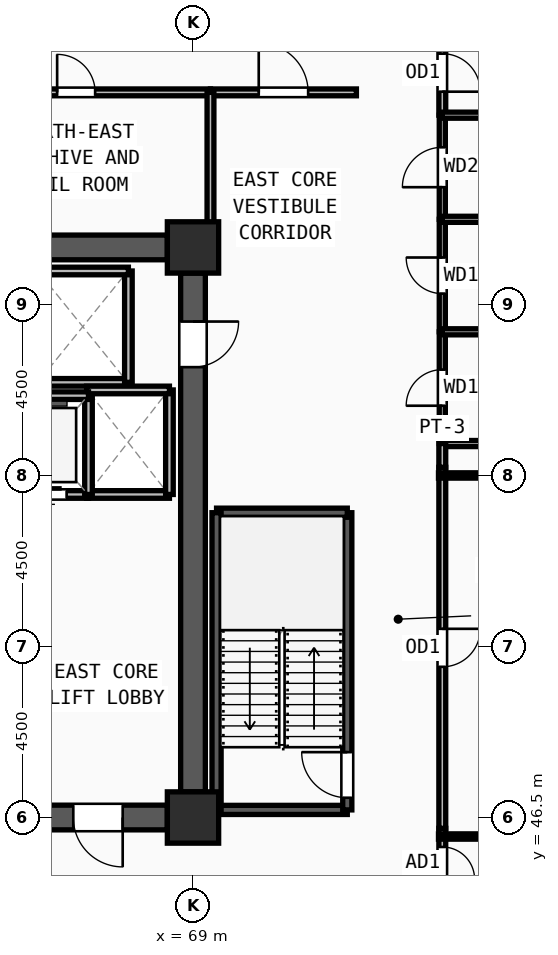
"""IFC4 building model, lengths in metres.
Left out: names, types, materials, properties, quantities, classifications, styles, units other than length and angle.
Written with IfcOpenShell. Run it as: python <this file> out.ifc"""

import sys

from ifc_helpers import new_model, si_unit, direction, frame, frame_2d, origin, origin_2d, place, context, subcontext, project, spatial, rectangle, extrude, source, transform, mapped, element, fill, save


model = new_model("IFC4")
c1 = context("Model", 3, precision=1e-05, world=origin(), true_north=direction((0.0, 1.0)))
c2 = subcontext(c1, "Body", "Model", "MODEL_VIEW")
j1 = project(units=[si_unit("LENGTHUNIT", "METRE"), si_unit("PLANEANGLEUNIT", "RADIAN")], contexts=[c1])
p1 = place(None, origin())
s1 = spatial("IfcSite", under=j1, at=p1, CompositionType="ELEMENT")
p2 = place(p1, origin())
s2 = spatial("IfcBuilding", under=s1, at=p2, CompositionType="ELEMENT")
p3 = place(p2, frame((0.0, 0.0, 201.75)))
s3 = spatial("IfcBuildingStorey", under=s2, at=p3, CompositionType="ELEMENT", Elevation=201.75)
m1 = source(origin(), c2, "Body", "SweptSolid", [
    extrude(rectangle(XDim=1.35, YDim=1.35, at=origin_2d()), origin(), (0.0, 0.0, 1.0), 3.75),
])
for number, where, z_axis, x_axis in (
    (1, (69.0, 46.5, 0.0), (0.0, 0.0, 1.0), (1.0, 0.0, 0.0)),
    (2, (69.0, 61.5, 0.0), (0.0, 0.0, 1.0), (1.0, 0.0, 0.0)),
):
    element("IfcColumn", number, at=place(p3, frame(where, z_axis=z_axis, x_axis=x_axis)), inside=s3, PredefinedType="COLUMN", context=c2, shape_type="MappedRepresentation", body=[
        mapped(m1, transform((0.0, 0.0, 0.0), x_axis=(1.0, 0.0, 0.0), y_axis=(0.0, 1.0, 0.0), z_axis=(0.0, 0.0, 1.0), scale=1.0)),
    ])
p4 = place(p3, frame((60.675, 61.5, 0.0), z_axis=(0.0, 0.0, 1.0), x_axis=(1.0, 0.0, 0.0)))
e3 = element("IfcWall", 3, at=p4, inside=s3, PredefinedType="SHEAR", context=c2, shape_type="SweptSolid", body=[
    extrude(rectangle(XDim=7.65, YDim=0.65, at=frame_2d((3.825, 0.0))), origin(), (0.0, 0.0, 1.0), 3.57),
])
p5 = place(p3, frame((69.0, 60.825, 0.0), z_axis=(0.0, 0.0, 1.0), x_axis=(0.0, -1.0, 0.0)))
e4 = element("IfcWall", 4, at=p5, inside=s3, PredefinedType="SHEAR", context=c2, shape_type="SweptSolid", body=[
    extrude(rectangle(XDim=13.65, YDim=0.65, at=frame_2d((6.825, 0.0))), origin(), (0.0, 0.0, 1.0), 3.57),
])
m2 = source(origin(), c2, "Body", "SweptSolid", [
    extrude(rectangle(XDim=1.2, YDim=2.2, at=frame_2d((0.6, 1.1))), frame((0.0, 0.335, 0.0), z_axis=(0.0, -1.0, 0.0), x_axis=(1.0, 0.0, 0.0)), (0.0, 0.0, 1.0), 0.67),
])
p6 = place(p5, frame((1.275, 0.0, 0.0)))
e5 = element("IfcOpeningElement", 5, at=p6, cuts=e4, PredefinedType="OPENING", context=c2, shape_type="MappedRepresentation", body=[
    mapped(m2, transform((0.0, 0.0, 0.0), x_axis=(1.0, 0.0, 0.0), y_axis=(0.0, 1.0, 0.0), z_axis=(0.0, 0.0, 1.0), scale=1.0)),
])
p7 = place(p3, frame((68.325, 46.5, 0.0), z_axis=(0.0, 0.0, 1.0), x_axis=(-1.0, 0.0, 0.0)))
e6 = element("IfcWall", 6, at=p7, inside=s3, PredefinedType="SHEAR", context=c2, shape_type="SweptSolid", body=[
    extrude(rectangle(XDim=7.65, YDim=0.65, at=frame_2d((3.825, 0.0))), origin(), (0.0, 0.0, 1.0), 3.57),
])
m3 = source(origin(), c2, "Body", "SweptSolid", [
    extrude(rectangle(XDim=1.3, YDim=2.2, at=frame_2d((0.65, 1.1))), frame((0.0, 0.335, 0.0), z_axis=(0.0, -1.0, 0.0), x_axis=(1.0, 0.0, 0.0)), (0.0, 0.0, 1.0), 0.67),
])
p8 = place(p7, frame((1.175, 0.0, 0.0)))
e7 = element("IfcOpeningElement", 7, at=p8, cuts=e6, PredefinedType="OPENING", context=c2, shape_type="MappedRepresentation", body=[
    mapped(m3, transform((0.0, 0.0, 0.0), x_axis=(1.0, 0.0, 0.0), y_axis=(0.0, 1.0, 0.0), z_axis=(0.0, 0.0, 1.0), scale=1.0)),
])
p9 = place(p3, frame((69.62, 46.7, 0.0), z_axis=(0.0, 0.0, 1.0), x_axis=(1.0, 0.0, 0.0)))
e8 = element("IfcWall", 8, at=p9, inside=s3, PredefinedType="SOLIDWALL", context=c2, shape_type="SweptSolid", body=[
    extrude(rectangle(XDim=3.44, YDim=0.24, at=frame_2d((1.72, 0.0))), origin(), (0.0, 0.0, 1.0), 3.57),
])
p10 = place(p3, frame((73.06, 46.7, 0.0), z_axis=(0.0, 0.0, 1.0), x_axis=(0.0, 1.0, 0.0)))
e9 = element("IfcWall", 9, at=p10, inside=s3, PredefinedType="SOLIDWALL", context=c2, shape_type="SweptSolid", body=[
    extrude(rectangle(XDim=7.82, YDim=0.24, at=frame_2d((3.91, 0.0))), origin(), (0.0, 0.0, 1.0), 3.57),
])
m4 = source(origin(), c2, "Body", "SweptSolid", [
    extrude(rectangle(XDim=1.2, YDim=2.2, at=frame_2d((0.6, 1.1))), frame((0.0, 0.13, 0.0), z_axis=(0.0, -1.0, 0.0), x_axis=(1.0, 0.0, 0.0)), (0.0, 0.0, 1.0), 0.26),
])
p11 = place(p10, frame((0.32, 0.0, 0.0)))
e10 = element("IfcOpeningElement", 10, at=p11, cuts=e9, PredefinedType="OPENING", context=c2, shape_type="MappedRepresentation", body=[
    mapped(m4, transform((0.0, 0.0, 0.0), x_axis=(1.0, 0.0, 0.0), y_axis=(0.0, 1.0, 0.0), z_axis=(0.0, 0.0, 1.0), scale=1.0)),
])
p12 = place(p3, frame((73.06, 54.52, 0.0), z_axis=(0.0, 0.0, 1.0), x_axis=(-1.0, 0.0, 0.0)))
e11 = element("IfcWall", 11, at=p12, inside=s3, PredefinedType="SOLIDWALL", context=c2, shape_type="SweptSolid", body=[
    extrude(rectangle(XDim=3.44, YDim=0.24, at=frame_2d((1.72, 0.0))), origin(), (0.0, 0.0, 1.0), 3.57),
])
p13 = place(p3, frame((69.62, 54.52, 0.0), z_axis=(0.0, 0.0, 1.0), x_axis=(0.0, -1.0, 0.0)))
e12 = element("IfcWall", 12, at=p13, inside=s3, PredefinedType="SOLIDWALL", context=c2, shape_type="SweptSolid", body=[
    extrude(rectangle(XDim=7.82, YDim=0.24, at=frame_2d((3.91, 0.0))), origin(), (0.0, 0.0, 1.0), 3.57),
])
p14 = place(p3, frame((64.9, 57.95, 0.0), z_axis=(0.0, 0.0, 1.0), x_axis=(1.0, 0.0, 0.0)))
e13 = element("IfcWall", 13, at=p14, inside=s3, PredefinedType="SOLIDWALL", context=c2, shape_type="SweptSolid", body=[
    extrude(rectangle(XDim=2.4, YDim=0.2, at=frame_2d((1.2, 0.0))), origin(), (0.0, 0.0, 1.0), 3.57),
])
p15 = place(p3, frame((67.3, 57.95, 0.0), z_axis=(0.0, 0.0, 1.0), x_axis=(0.0, 1.0, 0.0)))
e14 = element("IfcWall", 14, at=p15, inside=s3, PredefinedType="SOLIDWALL", context=c2, shape_type="SweptSolid", body=[
    extrude(rectangle(XDim=2.93, YDim=0.2, at=frame_2d((1.465, 0.0))), origin(), (0.0, 0.0, 1.0), 3.57),
])
p16 = place(p3, frame((67.3, 60.88, 0.0), z_axis=(0.0, 0.0, 1.0), x_axis=(-1.0, 0.0, 0.0)))
e15 = element("IfcWall", 15, at=p16, inside=s3, PredefinedType="SOLIDWALL", context=c2, shape_type="SweptSolid", body=[
    extrude(rectangle(XDim=2.4, YDim=0.2, at=frame_2d((1.2, 0.0))), origin(), (0.0, 0.0, 1.0), 3.57),
])
p17 = place(p3, frame((66.2, 55.0, 0.0), z_axis=(0.0, 0.0, 1.0), x_axis=(1.0, 0.0, 0.0)))
e16 = element("IfcWall", 16, at=p17, inside=s3, PredefinedType="SOLIDWALL", context=c2, shape_type="SweptSolid", body=[
    extrude(rectangle(XDim=2.18, YDim=0.2, at=frame_2d((1.09, 0.0))), origin(), (0.0, 0.0, 1.0), 3.57),
])
p18 = place(p3, frame((68.38, 55.0, 0.0), z_axis=(0.0, 0.0, 1.0), x_axis=(0.0, 1.0, 0.0)))
e17 = element("IfcWall", 17, at=p18, inside=s3, PredefinedType="SOLIDWALL", context=c2, shape_type="SweptSolid", body=[
    extrude(rectangle(XDim=2.75, YDim=0.2, at=frame_2d((1.375, 0.0))), origin(), (0.0, 0.0, 1.0), 3.57),
])
p19 = place(p3, frame((68.38, 57.75, 0.0), z_axis=(0.0, 0.0, 1.0), x_axis=(-1.0, 0.0, 0.0)))
e18 = element("IfcWall", 18, at=p19, inside=s3, PredefinedType="SOLIDWALL", context=c2, shape_type="SweptSolid", body=[
    extrude(rectangle(XDim=2.18, YDim=0.2, at=frame_2d((1.09, 0.0))), origin(), (0.0, 0.0, 1.0), 3.57),
])
p20 = place(p3, frame((64.0, 55.0, 0.0), z_axis=(0.0, 0.0, 1.0), x_axis=(1.0, 0.0, 0.0)))
e19 = element("IfcWall", 19, at=p20, inside=s3, PredefinedType="SOLIDWALL", context=c2, shape_type="SweptSolid", body=[
    extrude(rectangle(XDim=2.25, YDim=0.2, at=frame_2d((1.125, 0.0))), origin(), (0.0, 0.0, 1.0), 3.57),
])
m5 = source(origin(), c2, "Body", "SweptSolid", [
    extrude(rectangle(XDim=1.1, YDim=2.2, at=frame_2d((0.55, 1.1))), frame((0.0, 0.11, 0.0), z_axis=(0.0, -1.0, 0.0), x_axis=(1.0, 0.0, 0.0)), (0.0, 0.0, 1.0), 0.22),
])
p21 = place(p20, frame((0.575, 0.0, 0.0)))
e20 = element("IfcOpeningElement", 20, at=p21, cuts=e19, PredefinedType="OPENING", context=c2, shape_type="MappedRepresentation", body=[
    mapped(m5, transform((0.0, 0.0, 0.0), x_axis=(1.0, 0.0, 0.0), y_axis=(0.0, 1.0, 0.0), z_axis=(0.0, 0.0, 1.0), scale=1.0)),
])
p22 = place(p3, frame((66.25, 55.0, 0.0), z_axis=(0.0, 0.0, 1.0), x_axis=(0.0, 1.0, 0.0)))
e21 = element("IfcWall", 21, at=p22, inside=s3, PredefinedType="SOLIDWALL", context=c2, shape_type="SweptSolid", body=[
    extrude(rectangle(XDim=2.6, YDim=0.2, at=frame_2d((1.3, 0.0))), origin(), (0.0, 0.0, 1.0), 3.57),
])
p23 = place(p3, frame((66.25, 57.6, 0.0), z_axis=(0.0, 0.0, 1.0), x_axis=(-1.0, 0.0, 0.0)))
e22 = element("IfcWall", 22, at=p23, inside=s3, PredefinedType="SOLIDWALL", context=c2, shape_type="SweptSolid", body=[
    extrude(rectangle(XDim=2.25, YDim=0.2, at=frame_2d((1.125, 0.0))), origin(), (0.0, 0.0, 1.0), 3.57),
])
p24 = place(p3, frame((75.56, 56.34, 0.0), z_axis=(0.0, 0.0, 1.0), x_axis=(0.0, 1.0, 0.0)))
e23 = element("IfcWall", 23, at=p24, inside=s3, PredefinedType="PARTITIONING", context=c2, shape_type="SweptSolid", body=[
    extrude(rectangle(XDim=2.94, YDim=0.16, at=frame_2d((1.47, 0.0))), origin(), (0.0, 0.0, 1.0), 3.57),
])
m6 = source(origin(), c2, "Body", "SweptSolid", [
    extrude(rectangle(XDim=0.95, YDim=2.15, at=frame_2d((0.475, 1.075))), frame((0.0, 0.09, 0.0), z_axis=(0.0, -1.0, 0.0), x_axis=(1.0, 0.0, 0.0)), (0.0, 0.0, 1.0), 0.18),
])
p25 = place(p24, frame((0.995, 0.0, 0.0)))
e24 = element("IfcOpeningElement", 24, at=p25, cuts=e23, PredefinedType="OPENING", context=c2, shape_type="MappedRepresentation", body=[
    mapped(m6, transform((0.0, 0.0, 0.0), x_axis=(1.0, 0.0, 0.0), y_axis=(0.0, 1.0, 0.0), z_axis=(0.0, 0.0, 1.0), scale=1.0)),
])
p26 = place(p3, frame((75.56, 59.28, 0.0), z_axis=(0.0, 0.0, 1.0), x_axis=(0.0, 1.0, 0.0)))
e25 = element("IfcWall", 25, at=p26, inside=s3, PredefinedType="PARTITIONING", context=c2, shape_type="SweptSolid", body=[
    extrude(rectangle(XDim=2.96, YDim=0.16, at=frame_2d((1.48, 0.0))), origin(), (0.0, 0.0, 1.0), 3.57),
])
p27 = place(p26, frame((1.005, 0.0, 0.0)))
e26 = element("IfcOpeningElement", 26, at=p27, cuts=e25, PredefinedType="OPENING", context=c2, shape_type="MappedRepresentation", body=[
    mapped(m6, transform((0.0, 0.0, 0.0), x_axis=(1.0, 0.0, 0.0), y_axis=(0.0, 1.0, 0.0), z_axis=(0.0, 0.0, 1.0), scale=1.0)),
])
p28 = place(p3, frame((75.56, 62.24, 0.0), z_axis=(0.0, 0.0, 1.0), x_axis=(0.0, 1.0, 0.0)))
e27 = element("IfcWall", 27, at=p28, inside=s3, PredefinedType="PARTITIONING", context=c2, shape_type="SweptSolid", body=[
    extrude(rectangle(XDim=2.74, YDim=0.16, at=frame_2d((1.37, 0.0))), origin(), (0.0, 0.0, 1.0), 3.57),
])
m7 = source(origin(), c2, "Body", "SweptSolid", [
    extrude(rectangle(XDim=1.05, YDim=2.15, at=frame_2d((0.525, 1.075))), frame((0.0, 0.09, 0.0), z_axis=(0.0, -1.0, 0.0), x_axis=(1.0, 0.0, 0.0)), (0.0, 0.0, 1.0), 0.18),
])
p29 = place(p28, frame((0.845, 0.0, 0.0)))
e28 = element("IfcOpeningElement", 28, at=p29, cuts=e27, PredefinedType="OPENING", context=c2, shape_type="MappedRepresentation", body=[
    mapped(m7, transform((0.0, 0.0, 0.0), x_axis=(1.0, 0.0, 0.0), y_axis=(0.0, 1.0, 0.0), z_axis=(0.0, 0.0, 1.0), scale=1.0)),
])
p30 = place(p3, frame((62.39, 65.58, 0.0), z_axis=(0.0, 0.0, 1.0), x_axis=(1.0, 0.0, 0.0)))
e29 = element("IfcWall", 29, at=p30, inside=s3, PredefinedType="PARTITIONING", context=c2, shape_type="SweptSolid", body=[
    extrude(rectangle(XDim=7.07, YDim=0.18, at=frame_2d((3.535, 0.0))), origin(), (0.0, 0.0, 1.0), 3.57),
])
m8 = source(origin(), c2, "Body", "SweptSolid", [
    extrude(rectangle(XDim=1.0, YDim=2.2, at=frame_2d((0.5, 1.1))), frame((0.0, 0.1, 0.0), z_axis=(0.0, -1.0, 0.0), x_axis=(1.0, 0.0, 0.0)), (0.0, 0.0, 1.0), 0.2),
])
p31 = place(p30, frame((3.035, 0.0, 0.0)))
e30 = element("IfcOpeningElement", 30, at=p31, cuts=e29, PredefinedType="OPENING", context=c2, shape_type="MappedRepresentation", body=[
    mapped(m8, transform((0.0, 0.0, 0.0), x_axis=(1.0, 0.0, 0.0), y_axis=(0.0, 1.0, 0.0), z_axis=(0.0, 0.0, 1.0), scale=1.0)),
])
p32 = place(p3, frame((69.46, 65.58, 0.0), z_axis=(0.0, 0.0, 1.0), x_axis=(1.0, 0.0, 0.0)))
e31 = element("IfcWall", 31, at=p32, inside=s3, PredefinedType="PARTITIONING", context=c2, shape_type="SweptSolid", body=[
    extrude(rectangle(XDim=3.84, YDim=0.18, at=frame_2d((1.92, 0.0))), origin(), (0.0, 0.0, 1.0), 3.57),
])
m9 = source(origin(), c2, "Body", "SweptSolid", [
    extrude(rectangle(XDim=1.3, YDim=2.2, at=frame_2d((0.65, 1.1))), frame((0.0, 0.1, 0.0), z_axis=(0.0, -1.0, 0.0), x_axis=(1.0, 0.0, 0.0)), (0.0, 0.0, 1.0), 0.2),
])
p33 = place(p32, frame((1.27, 0.0, 0.0)))
e32 = element("IfcOpeningElement", 32, at=p33, cuts=e31, PredefinedType="OPENING", context=c2, shape_type="MappedRepresentation", body=[
    mapped(m9, transform((0.0, 0.0, 0.0), x_axis=(1.0, 0.0, 0.0), y_axis=(0.0, 1.0, 0.0), z_axis=(0.0, 0.0, 1.0), scale=1.0)),
])
p34 = place(p3, frame((75.56, 67.215, 0.0), z_axis=(0.0, 0.0, 1.0), x_axis=(0.0, -1.0, 0.0)))
e33 = element("IfcWall", 33, at=p34, inside=s3, PredefinedType="PARTITIONING", context=c2, shape_type="SweptSolid", body=[
    extrude(rectangle(XDim=2.235, YDim=0.18, at=frame_2d((1.118, 0.0))), origin(), (0.0, 0.0, 1.0), 3.57),
])
p35 = place(p34, frame((0.617, 0.0, 0.0)))
e34 = element("IfcOpeningElement", 34, at=p35, cuts=e33, PredefinedType="OPENING", context=c2, shape_type="MappedRepresentation", body=[
    mapped(m8, transform((0.0, 0.0, 0.0), x_axis=(1.0, 0.0, 0.0), y_axis=(0.0, 1.0, 0.0), z_axis=(0.0, 0.0, 1.0), scale=1.0)),
])
p36 = place(p3, frame((75.56, 46.215, 0.0), z_axis=(0.0, 0.0, 1.0), x_axis=(0.0, -1.0, 0.0)))
e35 = element("IfcWall", 35, at=p36, inside=s3, PredefinedType="PARTITIONING", context=c2, shape_type="SweptSolid", body=[
    extrude(rectangle(XDim=1.83, YDim=0.18, at=frame_2d((0.915, 0.0))), origin(), (0.0, 0.0, 1.0), 3.57),
])
m10 = source(origin(), c2, "Body", "SweptSolid", [
    extrude(rectangle(XDim=0.85, YDim=2.1, at=frame_2d((0.425, 1.05))), frame((0.0, 0.1, 0.0), z_axis=(0.0, -1.0, 0.0), x_axis=(1.0, 0.0, 0.0)), (0.0, 0.0, 1.0), 0.2),
])
p37 = place(p36, frame((0.49, 0.0, 0.0)))
e36 = element("IfcOpeningElement", 36, at=p37, cuts=e35, PredefinedType="OPENING", context=c2, shape_type="MappedRepresentation", body=[
    mapped(m10, transform((0.0, 0.0, 0.0), x_axis=(1.0, 0.0, 0.0), y_axis=(0.0, 1.0, 0.0), z_axis=(0.0, 0.0, 1.0), scale=1.0)),
])
p38 = place(p3, frame((75.56, 55.715, 0.0), z_axis=(0.0, 0.0, 1.0), x_axis=(0.0, -1.0, 0.0)))
e37 = element("IfcWall", 37, at=p38, inside=s3, PredefinedType="PARTITIONING", context=c2, shape_type="SweptSolid", body=[
    extrude(rectangle(XDim=9.5, YDim=0.18, at=frame_2d((4.75, 0.0))), origin(), (0.0, 0.0, 1.0), 3.57),
])
p39 = place(p38, frame((4.25, 0.0, 0.0)))
e38 = element("IfcOpeningElement", 38, at=p39, cuts=e37, PredefinedType="OPENING", context=c2, shape_type="MappedRepresentation", body=[
    mapped(m8, transform((0.0, 0.0, 0.0), x_axis=(1.0, 0.0, 0.0), y_axis=(0.0, 1.0, 0.0), z_axis=(0.0, 0.0, 1.0), scale=1.0)),
])
for number, where, z_axis, x_axis in (
    (39, (75.56, 56.34, 0.0), (0.0, 0.0, 1.0), (1.0, 0.0, 0.0)),
    (40, (75.56, 59.28, 0.0), (0.0, 0.0, 1.0), (1.0, 0.0, 0.0)),
    (41, (75.56, 62.24, 0.0), (0.0, 0.0, 1.0), (1.0, 0.0, 0.0)),
    (42, (75.56, 64.98, 0.0), (0.0, 0.0, 1.0), (1.0, 0.0, 0.0)),
):
    element("IfcWall", number, at=place(p3, frame(where, z_axis=z_axis, x_axis=x_axis)), inside=s3, PredefinedType="PARTITIONING", context=c2, shape_type="SweptSolid", body=[
        extrude(rectangle(XDim=4.46, YDim=0.16, at=frame_2d((2.23, 0.0))), origin(), (0.0, 0.0, 1.0), 3.57),
    ])
p40 = place(p3, frame((69.46, 61.95, 0.0), z_axis=(0.0, 0.0, 1.0), x_axis=(0.0, 1.0, 0.0)))
e43 = element("IfcWall", 43, at=p40, inside=s3, PredefinedType="PARTITIONING", context=c2, shape_type="SweptSolid", body=[
    extrude(rectangle(XDim=3.63, YDim=0.18, at=frame_2d((1.815, 0.0))), origin(), (0.0, 0.0, 1.0), 3.57),
])
p41 = place(p3, frame((75.56, 56.34, 0.0), z_axis=(0.0, 0.0, 1.0), x_axis=(0.0, -1.0, 0.0)))
e44 = element("IfcWall", 44, at=p41, inside=s3, PredefinedType="PARTITIONING", context=c2, shape_type="SweptSolid", body=[
    extrude(rectangle(XDim=0.625, YDim=0.18, at=frame_2d((0.312, 0.0))), origin(), (0.0, 0.0, 1.0), 3.57),
])
p42 = place(p3, frame((75.46, 46.0, 0.0), z_axis=(0.0, 0.0, 1.0), x_axis=(1.0, 0.0, 0.0)))
e45 = element("IfcWall", 45, at=p42, inside=s3, PredefinedType="PARTITIONING", context=c2, shape_type="SweptSolid", body=[
    extrude(rectangle(XDim=8.468, YDim=0.14, at=frame_2d((4.234, 0.0))), origin(), (0.0, 0.0, 1.0), 3.57),
])
p43 = place(p3, frame((75.46, 55.5, 0.0), z_axis=(0.0, 0.0, 1.0), x_axis=(1.0, 0.0, 0.0)))
e46 = element("IfcWall", 46, at=p43, inside=s3, PredefinedType="PARTITIONING", context=c2, shape_type="SweptSolid", body=[
    extrude(rectangle(XDim=13.199, YDim=0.14, at=frame_2d((6.6, 0.0))), origin(), (0.0, 0.0, 1.0), 3.57),
])
m11 = source(origin(), c2, "Body", "SweptSolid", [
    extrude(rectangle(XDim=1.3, YDim=2.2, at=frame_2d((0.65, 1.1))), frame((0.0, 0.025, 0.0), z_axis=(0.0, -1.0, 0.0), x_axis=(1.0, 0.0, 0.0)), (0.0, 0.0, 1.0), 0.05),
])
p44 = place(p8, origin())
e47 = element("IfcDoor", 47, at=p44, inside=s3, OperationType="SINGLE_SWING_LEFT", PredefinedType="DOOR", context=c2, shape_type="MappedRepresentation", body=[
    mapped(m11, transform((0.0, 0.0, 0.0), x_axis=(1.0, 0.0, 0.0), y_axis=(0.0, 1.0, 0.0), z_axis=(0.0, 0.0, 1.0), scale=1.0)),
])
fill(e7, e47)
m12 = source(origin(), c2, "Body", "SweptSolid", [
    extrude(rectangle(XDim=1.2, YDim=2.2, at=frame_2d((0.6, 1.1))), frame((0.0, 0.025, 0.0), z_axis=(0.0, -1.0, 0.0), x_axis=(1.0, 0.0, 0.0)), (0.0, 0.0, 1.0), 0.05),
])
p45 = place(p6, origin())
e48 = element("IfcDoor", 48, at=p45, inside=s3, OperationType="SINGLE_SWING_LEFT", PredefinedType="DOOR", context=c2, shape_type="MappedRepresentation", body=[
    mapped(m12, transform((0.0, 0.0, 0.0), x_axis=(1.0, 0.0, 0.0), y_axis=(0.0, 1.0, 0.0), z_axis=(0.0, 0.0, 1.0), scale=1.0)),
])
fill(e5, e48)
p46 = place(p11, origin())
e49 = element("IfcDoor", 49, at=p46, inside=s3, OperationType="SINGLE_SWING_RIGHT", PredefinedType="DOOR", context=c2, shape_type="MappedRepresentation", body=[
    mapped(m12, transform((0.0, 0.0, 0.0), x_axis=(1.0, 0.0, 0.0), y_axis=(0.0, 1.0, 0.0), z_axis=(0.0, 0.0, 1.0), scale=1.0)),
])
fill(e10, e49)
m13 = source(origin(), c2, "Body", "SweptSolid", [
    extrude(rectangle(XDim=1.1, YDim=2.2, at=frame_2d((0.55, 1.1))), frame((0.0, 0.025, 0.0), z_axis=(0.0, -1.0, 0.0), x_axis=(1.0, 0.0, 0.0)), (0.0, 0.0, 1.0), 0.05),
])
p47 = place(p21, origin())
e50 = element("IfcDoor", 50, at=p47, inside=s3, OperationType="SLIDING_TO_LEFT", PredefinedType="DOOR", context=c2, shape_type="MappedRepresentation", body=[
    mapped(m13, transform((0.0, 0.0, 0.0), x_axis=(1.0, 0.0, 0.0), y_axis=(0.0, 1.0, 0.0), z_axis=(0.0, 0.0, 1.0), scale=1.0)),
])
fill(e20, e50)
m14 = source(origin(), c2, "Body", "SweptSolid", [
    extrude(rectangle(XDim=0.95, YDim=2.15, at=frame_2d((0.475, 1.075))), frame((0.0, 0.025, 0.0), z_axis=(0.0, -1.0, 0.0), x_axis=(1.0, 0.0, 0.0)), (0.0, 0.0, 1.0), 0.05),
])
p48 = place(p25, origin())
e51 = element("IfcDoor", 51, at=p48, inside=s3, OperationType="SINGLE_SWING_LEFT", PredefinedType="DOOR", context=c2, shape_type="MappedRepresentation", body=[
    mapped(m14, transform((0.0, 0.0, 0.0), x_axis=(1.0, 0.0, 0.0), y_axis=(0.0, 1.0, 0.0), z_axis=(0.0, 0.0, 1.0), scale=1.0)),
])
fill(e24, e51)
p49 = place(p27, origin())
e52 = element("IfcDoor", 52, at=p49, inside=s3, OperationType="SINGLE_SWING_RIGHT", PredefinedType="DOOR", context=c2, shape_type="MappedRepresentation", body=[
    mapped(m14, transform((0.0, 0.0, 0.0), x_axis=(1.0, 0.0, 0.0), y_axis=(0.0, 1.0, 0.0), z_axis=(0.0, 0.0, 1.0), scale=1.0)),
])
fill(e26, e52)
m15 = source(origin(), c2, "Body", "SweptSolid", [
    extrude(rectangle(XDim=1.05, YDim=2.15, at=frame_2d((0.525, 1.075))), frame((0.0, 0.025, 0.0), z_axis=(0.0, -1.0, 0.0), x_axis=(1.0, 0.0, 0.0)), (0.0, 0.0, 1.0), 0.05),
])
p50 = place(p29, origin())
e53 = element("IfcDoor", 53, at=p50, inside=s3, OperationType="SINGLE_SWING_LEFT", PredefinedType="DOOR", context=c2, shape_type="MappedRepresentation", body=[
    mapped(m15, transform((0.0, 0.0, 0.0), x_axis=(1.0, 0.0, 0.0), y_axis=(0.0, 1.0, 0.0), z_axis=(0.0, 0.0, 1.0), scale=1.0)),
])
fill(e28, e53)
m16 = source(origin(), c2, "Body", "SweptSolid", [
    extrude(rectangle(XDim=1.0, YDim=2.2, at=frame_2d((0.5, 1.1))), frame((0.0, 0.025, 0.0), z_axis=(0.0, -1.0, 0.0), x_axis=(1.0, 0.0, 0.0)), (0.0, 0.0, 1.0), 0.05),
])
p51 = place(p31, origin())
e54 = element("IfcDoor", 54, at=p51, inside=s3, OperationType="SINGLE_SWING_LEFT", PredefinedType="DOOR", context=c2, shape_type="MappedRepresentation", body=[
    mapped(m16, transform((0.0, 0.0, 0.0), x_axis=(1.0, 0.0, 0.0), y_axis=(0.0, 1.0, 0.0), z_axis=(0.0, 0.0, 1.0), scale=1.0)),
])
fill(e30, e54)
p52 = place(p33, origin())
e55 = element("IfcDoor", 55, at=p52, inside=s3, OperationType="SINGLE_SWING_LEFT", PredefinedType="DOOR", context=c2, shape_type="MappedRepresentation", body=[
    mapped(m11, transform((0.0, 0.0, 0.0), x_axis=(1.0, 0.0, 0.0), y_axis=(0.0, 1.0, 0.0), z_axis=(0.0, 0.0, 1.0), scale=1.0)),
])
fill(e32, e55)
p53 = place(p35, origin())
e56 = element("IfcDoor", 56, at=p53, inside=s3, OperationType="SINGLE_SWING_RIGHT", PredefinedType="DOOR", context=c2, shape_type="MappedRepresentation", body=[
    mapped(m16, transform((0.0, 0.0, 0.0), x_axis=(1.0, 0.0, 0.0), y_axis=(0.0, 1.0, 0.0), z_axis=(0.0, 0.0, 1.0), scale=1.0)),
])
fill(e34, e56)
m17 = source(origin(), c2, "Body", "SweptSolid", [
    extrude(rectangle(XDim=0.85, YDim=2.1, at=frame_2d((0.425, 1.05))), frame((0.0, 0.025, 0.0), z_axis=(0.0, -1.0, 0.0), x_axis=(1.0, 0.0, 0.0)), (0.0, 0.0, 1.0), 0.05),
])
p54 = place(p37, origin())
e57 = element("IfcDoor", 57, at=p54, inside=s3, OperationType="SINGLE_SWING_RIGHT", PredefinedType="DOOR", context=c2, shape_type="MappedRepresentation", body=[
    mapped(m17, transform((0.0, 0.0, 0.0), x_axis=(1.0, 0.0, 0.0), y_axis=(0.0, 1.0, 0.0), z_axis=(0.0, 0.0, 1.0), scale=1.0)),
])
fill(e36, e57)
p55 = place(p39, origin())
e58 = element("IfcDoor", 58, at=p55, inside=s3, OperationType="SINGLE_SWING_LEFT", PredefinedType="DOOR", context=c2, shape_type="MappedRepresentation", body=[
    mapped(m16, transform((0.0, 0.0, 0.0), x_axis=(1.0, 0.0, 0.0), y_axis=(0.0, 1.0, 0.0), z_axis=(0.0, 0.0, 1.0), scale=1.0)),
])
fill(e38, e58)
save(model, sys.argv[1])
